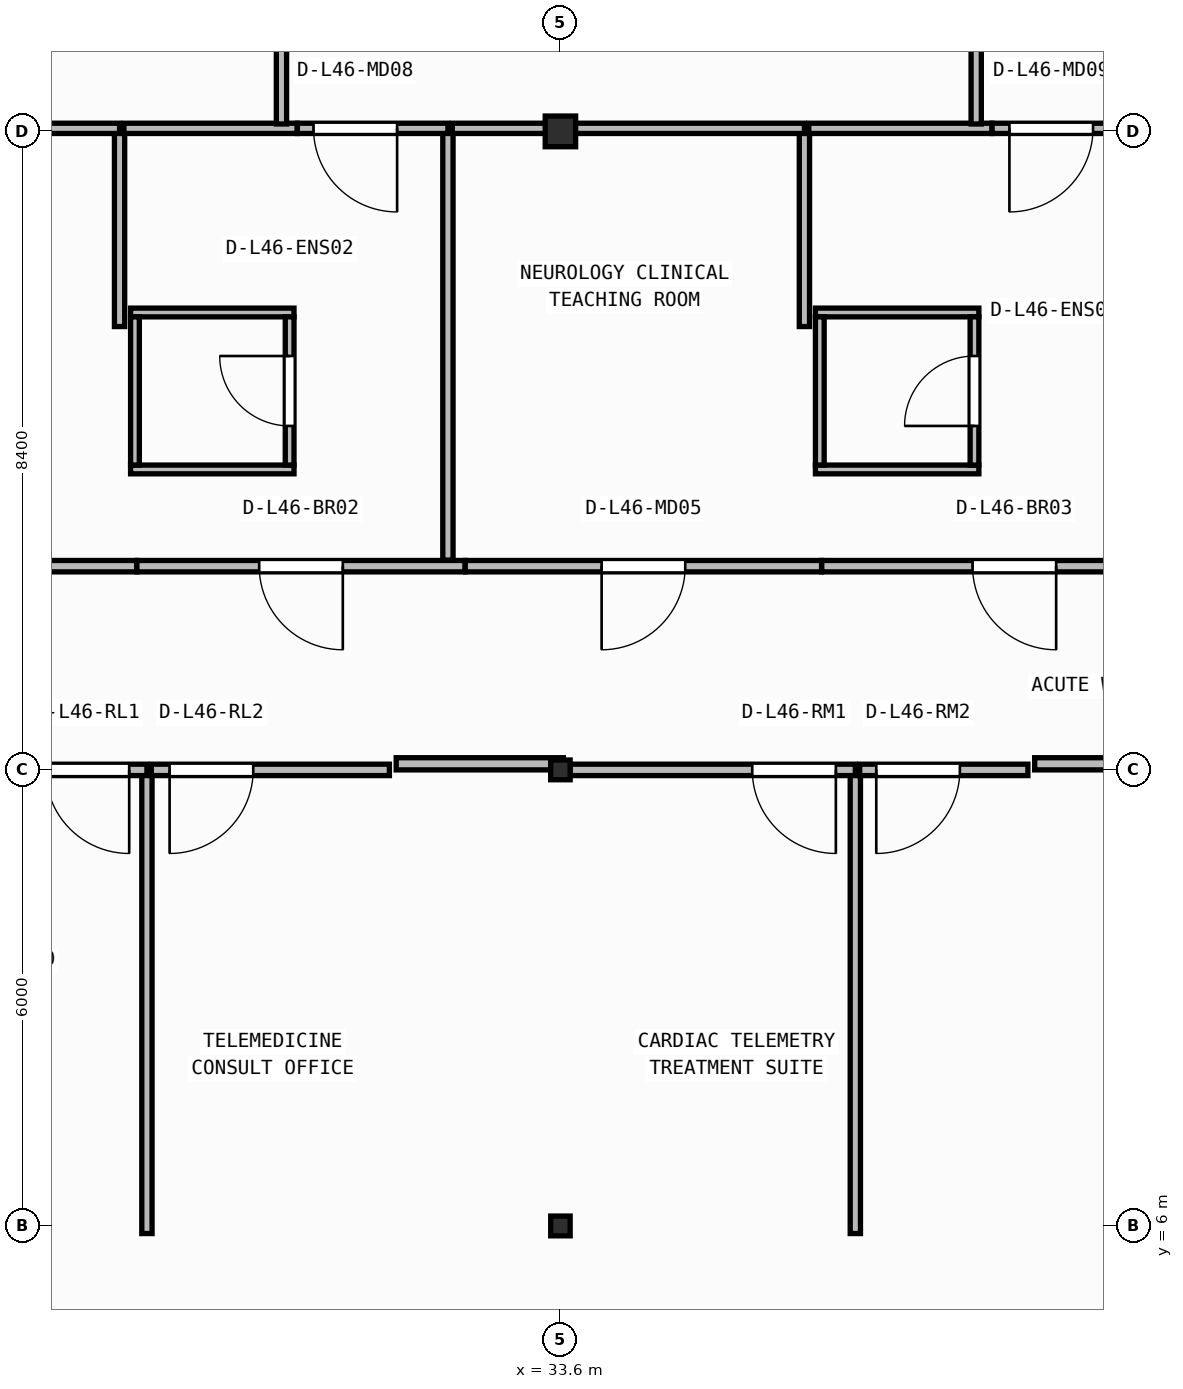
"""IFC4 building model, lengths in metres.
Left out: names, types, materials, properties, quantities, classifications, styles, units other than length and angle.
Written with IfcOpenShell. Run it as: python <this file> out.ifc"""

import sys

from ifc_helpers import new_model, si_unit, direction, frame, frame_2d, origin, origin_2d, place, context, subcontext, project, spatial, rectangle, i_section, extrude, element, fill, save


model = new_model("IFC4")
c1 = context("Model", 3, precision=1e-05, world=origin(), true_north=direction((0.0, 1.0)))
c2 = subcontext(c1, "Body", "Model", "MODEL_VIEW")
j1 = project(units=[si_unit("LENGTHUNIT", "METRE"), si_unit("PLANEANGLEUNIT", "RADIAN")], contexts=[c1])
p1 = place(None, origin())
s1 = spatial("IfcSite", under=j1, at=p1, CompositionType="ELEMENT")
p2 = place(p1, origin())
s2 = spatial("IfcBuilding", under=s1, at=p2, CompositionType="ELEMENT")
p3 = place(p2, frame((0.0, 0.0, 188.15)))
s3 = spatial("IfcBuildingStorey", under=s2, at=p3, CompositionType="ELEMENT", Elevation=188.15)
for number, where, z_axis, x_axis in (
    (1, (33.6, 6.0, 0.0), (0.0, 0.0, 1.0), (1.0, 0.0, 0.0)),
    (2, (33.6, 12.0, 0.0), (0.0, 0.0, 1.0), (1.0, 0.0, 0.0)),
):
    element("IfcColumn", number, at=place(p3, frame(where, z_axis=z_axis, x_axis=x_axis)), inside=s3, PredefinedType="COLUMN", context=c2, shape_type="SweptSolid", body=[
        extrude(i_section(OverallWidth=0.256, OverallDepth=0.26, WebThickness=0.01, FlangeThickness=0.017, FilletRadius=0.013, at=origin_2d()), origin(), (0.0, 0.0, 1.0), 3.95),
    ])
p4 = place(p3, frame((33.6, 20.4, 0.0), z_axis=(0.0, 0.0, 1.0), x_axis=(1.0, 0.0, 0.0)))
e3 = element("IfcColumn", 3, at=p4, inside=s3, PredefinedType="COLUMN", context=c2, shape_type="SweptSolid", body=[
    extrude(i_section(OverallWidth=0.4, OverallDepth=0.404, WebThickness=0.02, FlangeThickness=0.032, at=origin_2d()), origin(), (0.0, 0.0, 1.0), 3.95),
])
p5 = place(p3, frame((27.945, 15.952, 0.0), z_axis=(0.0, 0.0, 1.0), x_axis=(1.0, 0.0, 0.0)))
e4 = element("IfcWall", 4, at=p5, inside=s3, PredefinedType="PARTITIONING", context=c2, shape_type="SweptSolid", body=[
    extrude(rectangle(XDim=2.15, YDim=0.115, at=frame_2d((1.075, 0.0))), origin(), (0.0, 0.0, 1.0), 3.378),
])
p6 = place(p3, frame((27.945, 18.018, 0.0), z_axis=(0.0, 0.0, 1.0), x_axis=(1.0, 0.0, 0.0)))
e5 = element("IfcWall", 5, at=p6, inside=s3, PredefinedType="PARTITIONING", context=c2, shape_type="SweptSolid", body=[
    extrude(rectangle(XDim=2.15, YDim=0.115, at=frame_2d((1.075, 0.0))), origin(), (0.0, 0.0, 1.0), 3.71),
])
p7 = place(p3, frame((28.002, 16.01, 0.0), z_axis=(0.0, 0.0, 1.0), x_axis=(0.0, 1.0, 0.0)))
e6 = element("IfcWall", 6, at=p7, inside=s3, PredefinedType="PARTITIONING", context=c2, shape_type="SweptSolid", body=[
    extrude(rectangle(XDim=1.95, YDim=0.115, at=frame_2d((0.975, 0.0))), origin(), (0.0, 0.0, 1.0), 3.71),
])
p8 = place(p3, frame((30.038, 16.01, 0.0), z_axis=(0.0, 0.0, 1.0), x_axis=(0.0, 1.0, 0.0)))
e7 = element("IfcWall", 7, at=p8, inside=s3, PredefinedType="PARTITIONING", context=c2, shape_type="SweptSolid", body=[
    extrude(rectangle(XDim=1.95, YDim=0.115, at=frame_2d((0.975, 0.0))), origin(), (0.0, 0.0, 1.0), 3.71),
])
p9 = place(p8, frame((0.515, 0.0, 0.0)))
e8 = element("IfcOpeningElement", 8, at=p9, cuts=e7, PredefinedType="OPENING", context=c2, shape_type="SweptSolid", body=[
    extrude(rectangle(XDim=0.92, YDim=2.1, at=frame_2d((0.46, 1.05))), frame((0.0, 0.067, 0.0), z_axis=(0.0, -1.0, 0.0), x_axis=(1.0, 0.0, 0.0)), (0.0, 0.0, 1.0), 0.135),
])
p10 = place(p3, frame((36.955, 15.952, 0.0), z_axis=(0.0, 0.0, 1.0), x_axis=(1.0, 0.0, 0.0)))
e9 = element("IfcWall", 9, at=p10, inside=s3, PredefinedType="PARTITIONING", context=c2, shape_type="SweptSolid", body=[
    extrude(rectangle(XDim=2.15, YDim=0.115, at=frame_2d((1.075, 0.0))), origin(), (0.0, 0.0, 1.0), 3.378),
])
p11 = place(p3, frame((36.955, 18.018, 0.0), z_axis=(0.0, 0.0, 1.0), x_axis=(1.0, 0.0, 0.0)))
e10 = element("IfcWall", 10, at=p11, inside=s3, PredefinedType="PARTITIONING", context=c2, shape_type="SweptSolid", body=[
    extrude(rectangle(XDim=2.15, YDim=0.115, at=frame_2d((1.075, 0.0))), origin(), (0.0, 0.0, 1.0), 3.71),
])
p12 = place(p3, frame((37.012, 16.01, 0.0), z_axis=(0.0, 0.0, 1.0), x_axis=(0.0, 1.0, 0.0)))
e11 = element("IfcWall", 11, at=p12, inside=s3, PredefinedType="PARTITIONING", context=c2, shape_type="SweptSolid", body=[
    extrude(rectangle(XDim=1.95, YDim=0.115, at=frame_2d((0.975, 0.0))), origin(), (0.0, 0.0, 1.0), 3.71),
])
p13 = place(p3, frame((39.048, 16.01, 0.0), z_axis=(0.0, 0.0, 1.0), x_axis=(0.0, 1.0, 0.0)))
e12 = element("IfcWall", 12, at=p13, inside=s3, PredefinedType="PARTITIONING", context=c2, shape_type="SweptSolid", body=[
    extrude(rectangle(XDim=1.95, YDim=0.115, at=frame_2d((0.975, 0.0))), origin(), (0.0, 0.0, 1.0), 3.71),
])
p14 = place(p13, frame((0.515, 0.0, 0.0)))
e13 = element("IfcOpeningElement", 13, at=p14, cuts=e12, PredefinedType="OPENING", context=c2, shape_type="SweptSolid", body=[
    extrude(rectangle(XDim=0.92, YDim=2.1, at=frame_2d((0.46, 1.05))), frame((0.0, 0.067, 0.0), z_axis=(0.0, -1.0, 0.0), x_axis=(1.0, 0.0, 0.0)), (0.0, 0.0, 1.0), 0.135),
])
p15 = place(p3, frame((28.16, 5.9, 0.0), z_axis=(0.0, 0.0, 1.0), x_axis=(0.0, 1.0, 0.0)))
e14 = element("IfcWall", 14, at=p15, inside=s3, PredefinedType="PARTITIONING", context=c2, shape_type="SweptSolid", body=[
    extrude(rectangle(XDim=6.1, YDim=0.135, at=frame_2d((3.05, 0.0))), origin(), (0.0, 0.0, 1.0), 3.71),
])
p16 = place(p3, frame((28.16, 12.0, 0.0), z_axis=(0.0, 0.0, 1.0), x_axis=(-1.0, 0.0, 0.0)))
e15 = element("IfcWall", 15, at=p16, inside=s3, PredefinedType="PARTITIONING", context=c2, shape_type="SweptSolid", body=[
    extrude(rectangle(XDim=2.832, YDim=0.15, at=frame_2d((1.416, 0.0))), origin(), (0.0, 0.0, 1.0), 3.152),
])
p17 = place(p16, frame((0.233, 0.0, 0.0)))
e16 = element("IfcOpeningElement", 16, at=p17, cuts=e15, PredefinedType="OPENING", context=c2, shape_type="SweptSolid", body=[
    extrude(rectangle(XDim=1.1, YDim=2.1, at=frame_2d((0.55, 1.05))), frame((0.0, 0.085, 0.0), z_axis=(0.0, -1.0, 0.0), x_axis=(1.0, 0.0, 0.0)), (0.0, 0.0, 1.0), 0.17),
])
p18 = place(p3, frame((31.35, 12.0, 0.0), z_axis=(0.0, 0.0, 1.0), x_axis=(-1.0, 0.0, 0.0)))
e17 = element("IfcWall", 17, at=p18, inside=s3, PredefinedType="PARTITIONING", context=c2, shape_type="SweptSolid", body=[
    extrude(rectangle(XDim=3.133, YDim=0.15, at=frame_2d((1.566, 0.0))), origin(), (0.0, 0.0, 1.0), 3.152),
])
p19 = place(p18, frame((1.792, 0.0, 0.0)))
e18 = element("IfcOpeningElement", 18, at=p19, cuts=e17, PredefinedType="OPENING", context=c2, shape_type="SweptSolid", body=[
    extrude(rectangle(XDim=1.1, YDim=2.1, at=frame_2d((0.55, 1.05))), frame((0.0, 0.085, 0.0), z_axis=(0.0, -1.0, 0.0), x_axis=(1.0, 0.0, 0.0)), (0.0, 0.0, 1.0), 0.17),
])
p20 = place(p3, frame((37.48, 5.9, 0.0), z_axis=(0.0, 0.0, 1.0), x_axis=(0.0, 1.0, 0.0)))
e19 = element("IfcWall", 19, at=p20, inside=s3, PredefinedType="PARTITIONING", context=c2, shape_type="SweptSolid", body=[
    extrude(rectangle(XDim=6.1, YDim=0.135, at=frame_2d((3.05, 0.0))), origin(), (0.0, 0.0, 1.0), 3.71),
])
p21 = place(p3, frame((37.48, 12.0, 0.0), z_axis=(0.0, 0.0, 1.0), x_axis=(-1.0, 0.0, 0.0)))
e20 = element("IfcWall", 20, at=p21, inside=s3, PredefinedType="PARTITIONING", context=c2, shape_type="SweptSolid", body=[
    extrude(rectangle(XDim=3.752, YDim=0.15, at=frame_2d((1.876, 0.0))), origin(), (0.0, 0.0, 1.0), 3.152),
])
p22 = place(p21, frame((0.256, 0.0, 0.0)))
e21 = element("IfcOpeningElement", 21, at=p22, cuts=e20, PredefinedType="OPENING", context=c2, shape_type="SweptSolid", body=[
    extrude(rectangle(XDim=1.1, YDim=2.1, at=frame_2d((0.55, 1.05))), frame((0.0, 0.085, 0.0), z_axis=(0.0, -1.0, 0.0), x_axis=(1.0, 0.0, 0.0)), (0.0, 0.0, 1.0), 0.17),
])
p23 = place(p3, frame((39.75, 12.0, 0.0), z_axis=(0.0, 0.0, 1.0), x_axis=(-1.0, 0.0, 0.0)))
e22 = element("IfcWall", 22, at=p23, inside=s3, PredefinedType="PARTITIONING", context=c2, shape_type="SweptSolid", body=[
    extrude(rectangle(XDim=2.212, YDim=0.15, at=frame_2d((1.106, 0.0))), origin(), (0.0, 0.0, 1.0), 3.152),
])
p24 = place(p23, frame((0.895, 0.0, 0.0)))
e23 = element("IfcOpeningElement", 23, at=p24, cuts=e22, PredefinedType="OPENING", context=c2, shape_type="SweptSolid", body=[
    extrude(rectangle(XDim=1.1, YDim=2.1, at=frame_2d((0.55, 1.05))), frame((0.0, 0.085, 0.0), z_axis=(0.0, -1.0, 0.0), x_axis=(1.0, 0.0, 0.0)), (0.0, 0.0, 1.0), 0.17),
])
p25 = place(p3, frame((28.026, 14.68, 0.0), z_axis=(0.0, 0.0, 1.0), x_axis=(-1.0, 0.0, 0.0)))
e24 = element("IfcWall", 24, at=p25, inside=s3, PredefinedType="PARTITIONING", context=c2, shape_type="SweptSolid", body=[
    extrude(rectangle(XDim=5.068, YDim=0.15, at=frame_2d((2.534, 0.0))), origin(), (0.0, 0.0, 1.0), 3.71),
])
p26 = place(p25, frame((1.984, 0.0, 0.0)))
e25 = element("IfcOpeningElement", 25, at=p26, cuts=e24, PredefinedType="OPENING", context=c2, shape_type="SweptSolid", body=[
    extrude(rectangle(XDim=1.1, YDim=2.1, at=frame_2d((0.55, 1.05))), frame((0.0, 0.085, 0.0), z_axis=(0.0, -1.0, 0.0), x_axis=(1.0, 0.0, 0.0)), (0.0, 0.0, 1.0), 0.17),
])
p27 = place(p3, frame((32.346, 14.68, 0.0), z_axis=(0.0, 0.0, 1.0), x_axis=(-1.0, 0.0, 0.0)))
e26 = element("IfcWall", 26, at=p27, inside=s3, PredefinedType="PARTITIONING", context=c2, shape_type="SweptSolid", body=[
    extrude(rectangle(XDim=4.318, YDim=0.15, at=frame_2d((2.159, 0.0))), origin(), (0.0, 0.0, 1.0), 3.71),
])
p28 = place(p27, frame((1.609, 0.0, 0.0)))
e27 = element("IfcOpeningElement", 27, at=p28, cuts=e26, PredefinedType="OPENING", context=c2, shape_type="SweptSolid", body=[
    extrude(rectangle(XDim=1.1, YDim=2.1, at=frame_2d((0.55, 1.05))), frame((0.0, 0.085, 0.0), z_axis=(0.0, -1.0, 0.0), x_axis=(1.0, 0.0, 0.0)), (0.0, 0.0, 1.0), 0.17),
])
p29 = place(p3, frame((37.036, 14.68, 0.0), z_axis=(0.0, 0.0, 1.0), x_axis=(-1.0, 0.0, 0.0)))
e28 = element("IfcWall", 28, at=p29, inside=s3, PredefinedType="PARTITIONING", context=c2, shape_type="SweptSolid", body=[
    extrude(rectangle(XDim=4.688, YDim=0.15, at=frame_2d((2.344, 0.0))), origin(), (0.0, 0.0, 1.0), 3.71),
])
p30 = place(p29, frame((1.794, 0.0, 0.0)))
e29 = element("IfcOpeningElement", 29, at=p30, cuts=e28, PredefinedType="OPENING", context=c2, shape_type="SweptSolid", body=[
    extrude(rectangle(XDim=1.1, YDim=2.1, at=frame_2d((0.55, 1.05))), frame((0.0, 0.085, 0.0), z_axis=(0.0, -1.0, 0.0), x_axis=(1.0, 0.0, 0.0)), (0.0, 0.0, 1.0), 0.17),
])
p31 = place(p3, frame((42.106, 14.68, 0.0), z_axis=(0.0, 0.0, 1.0), x_axis=(-1.0, 0.0, 0.0)))
e30 = element("IfcWall", 30, at=p31, inside=s3, PredefinedType="PARTITIONING", context=c2, shape_type="SweptSolid", body=[
    extrude(rectangle(XDim=5.068, YDim=0.15, at=frame_2d((2.534, 0.0))), origin(), (0.0, 0.0, 1.0), 3.71),
])
p32 = place(p31, frame((1.984, 0.0, 0.0)))
e31 = element("IfcOpeningElement", 31, at=p32, cuts=e30, PredefinedType="OPENING", context=c2, shape_type="SweptSolid", body=[
    extrude(rectangle(XDim=1.1, YDim=2.1, at=frame_2d((0.55, 1.05))), frame((0.0, 0.085, 0.0), z_axis=(0.0, -1.0, 0.0), x_axis=(1.0, 0.0, 0.0)), (0.0, 0.0, 1.0), 0.17),
])
p33 = place(p3, frame((27.8, 17.833, 0.0), z_axis=(0.0, 0.0, 1.0), x_axis=(0.0, 1.0, 0.0)))
e32 = element("IfcWall", 32, at=p33, inside=s3, PredefinedType="PARTITIONING", context=c2, shape_type="SweptSolid", body=[
    extrude(rectangle(XDim=2.607, YDim=0.135, at=frame_2d((1.304, 0.0))), origin(), (0.0, 0.0, 1.0), 3.71),
])
p34 = place(p3, frame((27.8, 20.44, 0.0), z_axis=(0.0, 0.0, 1.0), x_axis=(-1.0, 0.0, 0.0)))
e33 = element("IfcWall", 33, at=p34, inside=s3, PredefinedType="PARTITIONING", context=c2, shape_type="SweptSolid", body=[
    extrude(rectangle(XDim=5.012, YDim=0.135, at=frame_2d((2.506, 0.0))), origin(), (0.0, 0.0, 1.0), 3.152),
])
p35 = place(p3, frame((32.12, 14.76, 0.0), z_axis=(0.0, 0.0, 1.0), x_axis=(0.0, 1.0, 0.0)))
e34 = element("IfcWall", 34, at=p35, inside=s3, PredefinedType="PARTITIONING", context=c2, shape_type="SweptSolid", body=[
    extrude(rectangle(XDim=5.68, YDim=0.135, at=frame_2d((2.84, 0.0))), origin(), (0.0, 0.0, 1.0), 3.71),
])
p36 = place(p3, frame((30.137, 20.44, 0.0), z_axis=(0.0, 0.0, 1.0), x_axis=(-1.0, 0.0, 0.0)))
e35 = element("IfcWall", 35, at=p36, inside=s3, PredefinedType="PARTITIONING", context=c2, shape_type="SweptSolid", body=[
    extrude(rectangle(XDim=2.28, YDim=0.135, at=frame_2d((1.14, 0.0))), origin(), (0.0, 0.0, 1.0), 3.152),
])
p37 = place(p3, frame((32.12, 20.44, 0.0), z_axis=(0.0, 0.0, 1.0), x_axis=(-1.0, 0.0, 0.0)))
e36 = element("IfcWall", 36, at=p37, inside=s3, PredefinedType="PARTITIONING", context=c2, shape_type="SweptSolid", body=[
    extrude(rectangle(XDim=1.981, YDim=0.135, at=frame_2d((0.99, 0.0))), origin(), (0.0, 0.0, 1.0), 3.152),
])
p38 = place(p37, frame((0.668, 0.0, 0.0)))
e37 = element("IfcOpeningElement", 37, at=p38, cuts=e36, PredefinedType="OPENING", context=c2, shape_type="SweptSolid", body=[
    extrude(rectangle(XDim=1.1, YDim=2.1, at=frame_2d((0.55, 1.05))), frame((0.0, 0.077, 0.0), z_axis=(0.0, -1.0, 0.0), x_axis=(1.0, 0.0, 0.0)), (0.0, 0.0, 1.0), 0.155),
])
p39 = place(p3, frame((36.81, 17.833, 0.0), z_axis=(0.0, 0.0, 1.0), x_axis=(0.0, 1.0, 0.0)))
e38 = element("IfcWall", 38, at=p39, inside=s3, PredefinedType="PARTITIONING", context=c2, shape_type="SweptSolid", body=[
    extrude(rectangle(XDim=2.607, YDim=0.135, at=frame_2d((1.304, 0.0))), origin(), (0.0, 0.0, 1.0), 3.71),
])
p40 = place(p3, frame((36.81, 20.44, 0.0), z_axis=(0.0, 0.0, 1.0), x_axis=(-1.0, 0.0, 0.0)))
e39 = element("IfcWall", 39, at=p40, inside=s3, PredefinedType="PARTITIONING", context=c2, shape_type="SweptSolid", body=[
    extrude(rectangle(XDim=4.633, YDim=0.135, at=frame_2d((2.316, 0.0))), origin(), (0.0, 0.0, 1.0), 3.152),
])
p41 = place(p3, frame((39.278, 20.44, 0.0), z_axis=(0.0, 0.0, 1.0), x_axis=(-1.0, 0.0, 0.0)))
e40 = element("IfcWall", 40, at=p41, inside=s3, PredefinedType="PARTITIONING", context=c2, shape_type="SweptSolid", body=[
    extrude(rectangle(XDim=2.41, YDim=0.135, at=frame_2d((1.205, 0.0))), origin(), (0.0, 0.0, 1.0), 3.152),
])
p42 = place(p3, frame((41.88, 20.44, 0.0), z_axis=(0.0, 0.0, 1.0), x_axis=(-1.0, 0.0, 0.0)))
e41 = element("IfcWall", 41, at=p42, inside=s3, PredefinedType="PARTITIONING", context=c2, shape_type="SweptSolid", body=[
    extrude(rectangle(XDim=2.6, YDim=0.135, at=frame_2d((1.3, 0.0))), origin(), (0.0, 0.0, 1.0), 3.152),
])
p43 = place(p42, frame((1.273, 0.0, 0.0)))
e42 = element("IfcOpeningElement", 42, at=p43, cuts=e41, PredefinedType="OPENING", context=c2, shape_type="SweptSolid", body=[
    extrude(rectangle(XDim=1.1, YDim=2.1, at=frame_2d((0.55, 1.05))), frame((0.0, 0.077, 0.0), z_axis=(0.0, -1.0, 0.0), x_axis=(1.0, 0.0, 0.0)), (0.0, 0.0, 1.0), 0.155),
])
for number, where, z_axis, x_axis in (
    (43, (29.93, 20.498, 0.0), (0.0, 0.0, 1.0), (0.0, 1.0, 0.0)),
    (44, (39.07, 20.498, 0.0), (0.0, 0.0, 1.0), (0.0, 1.0, 0.0)),
):
    element("IfcWall", number, at=place(p3, frame(where, z_axis=z_axis, x_axis=x_axis)), inside=s3, PredefinedType="PARTITIONING", context=c2, shape_type="SweptSolid", body=[
        extrude(rectangle(XDim=6.642, YDim=0.135, at=frame_2d((3.321, 0.0))), origin(), (0.0, 0.0, 1.0), 3.71),
    ])
p44 = place(p3, frame((31.439, 12.08, 0.0), z_axis=(0.0, 0.0, 1.0), x_axis=(1.0, 0.0, 0.0)))
e45 = element("IfcWall", 45, at=p44, inside=s3, PredefinedType="PARTITIONING", context=c2, shape_type="SweptSolid", body=[
    extrude(rectangle(XDim=2.199, YDim=0.16, at=frame_2d((1.1, 0.0))), origin(), (0.0, 0.0, 1.0), 3.152),
])
p45 = place(p3, frame((39.839, 12.08, 0.0), z_axis=(0.0, 0.0, 1.0), x_axis=(1.0, 0.0, 0.0)))
e46 = element("IfcWall", 46, at=p45, inside=s3, PredefinedType="PARTITIONING", context=c2, shape_type="SweptSolid", body=[
    extrude(rectangle(XDim=1.871, YDim=0.16, at=frame_2d((0.936, 0.0))), origin(), (0.0, 0.0, 1.0), 3.152),
])
p46 = place(p9, origin())
e47 = element("IfcDoor", 47, at=p46, inside=s3, OperationType="SINGLE_SWING_RIGHT", PredefinedType="DOOR", context=c2, shape_type="SweptSolid", body=[
    extrude(rectangle(XDim=0.92, YDim=2.1, at=frame_2d((0.46, 1.05))), frame((0.0, 0.025, 0.0), z_axis=(0.0, -1.0, 0.0), x_axis=(1.0, 0.0, 0.0)), (0.0, 0.0, 1.0), 0.05),
])
fill(e8, e47)
p47 = place(p14, origin())
e48 = element("IfcDoor", 48, at=p47, inside=s3, OperationType="SINGLE_SWING_LEFT", PredefinedType="DOOR", context=c2, shape_type="SweptSolid", body=[
    extrude(rectangle(XDim=0.92, YDim=2.1, at=frame_2d((0.46, 1.05))), frame((0.0, 0.025, 0.0), z_axis=(0.0, -1.0, 0.0), x_axis=(1.0, 0.0, 0.0)), (0.0, 0.0, 1.0), 0.05),
])
fill(e13, e48)
p48 = place(p17, origin())
e49 = element("IfcDoor", 49, at=p48, inside=s3, OperationType="SINGLE_SWING_LEFT", PredefinedType="DOOR", context=c2, shape_type="SweptSolid", body=[
    extrude(rectangle(XDim=1.1, YDim=2.1, at=frame_2d((0.55, 1.05))), frame((0.0, 0.025, 0.0), z_axis=(0.0, -1.0, 0.0), x_axis=(1.0, 0.0, 0.0)), (0.0, 0.0, 1.0), 0.05),
])
fill(e16, e49)
p49 = place(p19, origin())
e50 = element("IfcDoor", 50, at=p49, inside=s3, OperationType="SINGLE_SWING_RIGHT", PredefinedType="DOOR", context=c2, shape_type="SweptSolid", body=[
    extrude(rectangle(XDim=1.1, YDim=2.1, at=frame_2d((0.55, 1.05))), frame((0.0, 0.025, 0.0), z_axis=(0.0, -1.0, 0.0), x_axis=(1.0, 0.0, 0.0)), (0.0, 0.0, 1.0), 0.05),
])
fill(e18, e50)
p50 = place(p22, origin())
e51 = element("IfcDoor", 51, at=p50, inside=s3, OperationType="SINGLE_SWING_LEFT", PredefinedType="DOOR", context=c2, shape_type="SweptSolid", body=[
    extrude(rectangle(XDim=1.1, YDim=2.1, at=frame_2d((0.55, 1.05))), frame((0.0, 0.025, 0.0), z_axis=(0.0, -1.0, 0.0), x_axis=(1.0, 0.0, 0.0)), (0.0, 0.0, 1.0), 0.05),
])
fill(e21, e51)
p51 = place(p24, origin())
e52 = element("IfcDoor", 52, at=p51, inside=s3, OperationType="SINGLE_SWING_RIGHT", PredefinedType="DOOR", context=c2, shape_type="SweptSolid", body=[
    extrude(rectangle(XDim=1.1, YDim=2.1, at=frame_2d((0.55, 1.05))), frame((0.0, 0.025, 0.0), z_axis=(0.0, -1.0, 0.0), x_axis=(1.0, 0.0, 0.0)), (0.0, 0.0, 1.0), 0.05),
])
fill(e23, e52)
p52 = place(p28, origin())
e53 = element("IfcDoor", 53, at=p52, inside=s3, OperationType="SINGLE_SWING_LEFT", PredefinedType="DOOR", context=c2, shape_type="SweptSolid", body=[
    extrude(rectangle(XDim=1.1, YDim=2.1, at=frame_2d((0.55, 1.05))), frame((0.0, 0.025, 0.0), z_axis=(0.0, -1.0, 0.0), x_axis=(1.0, 0.0, 0.0)), (0.0, 0.0, 1.0), 0.05),
])
fill(e27, e53)
p53 = place(p30, origin())
e54 = element("IfcDoor", 54, at=p53, inside=s3, OperationType="SINGLE_SWING_RIGHT", PredefinedType="DOOR", context=c2, shape_type="SweptSolid", body=[
    extrude(rectangle(XDim=1.1, YDim=2.1, at=frame_2d((0.55, 1.05))), frame((0.0, 0.025, 0.0), z_axis=(0.0, -1.0, 0.0), x_axis=(1.0, 0.0, 0.0)), (0.0, 0.0, 1.0), 0.05),
])
fill(e29, e54)
p54 = place(p32, origin())
e55 = element("IfcDoor", 55, at=p54, inside=s3, OperationType="SINGLE_SWING_LEFT", PredefinedType="DOOR", context=c2, shape_type="SweptSolid", body=[
    extrude(rectangle(XDim=1.1, YDim=2.1, at=frame_2d((0.55, 1.05))), frame((0.0, 0.025, 0.0), z_axis=(0.0, -1.0, 0.0), x_axis=(1.0, 0.0, 0.0)), (0.0, 0.0, 1.0), 0.05),
])
fill(e31, e55)
p55 = place(p38, origin())
e56 = element("IfcDoor", 56, at=p55, inside=s3, OperationType="SINGLE_SWING_LEFT", PredefinedType="DOOR", context=c2, shape_type="SweptSolid", body=[
    extrude(rectangle(XDim=1.1, YDim=2.1, at=frame_2d((0.55, 1.05))), frame((0.0, 0.025, 0.0), z_axis=(0.0, -1.0, 0.0), x_axis=(1.0, 0.0, 0.0)), (0.0, 0.0, 1.0), 0.05),
])
fill(e37, e56)
p56 = place(p43, origin())
e57 = element("IfcDoor", 57, at=p56, inside=s3, OperationType="SINGLE_SWING_RIGHT", PredefinedType="DOOR", context=c2, shape_type="SweptSolid", body=[
    extrude(rectangle(XDim=1.1, YDim=2.1, at=frame_2d((0.55, 1.05))), frame((0.0, 0.025, 0.0), z_axis=(0.0, -1.0, 0.0), x_axis=(1.0, 0.0, 0.0)), (0.0, 0.0, 1.0), 0.05),
])
fill(e42, e57)
save(model, sys.argv[1])
